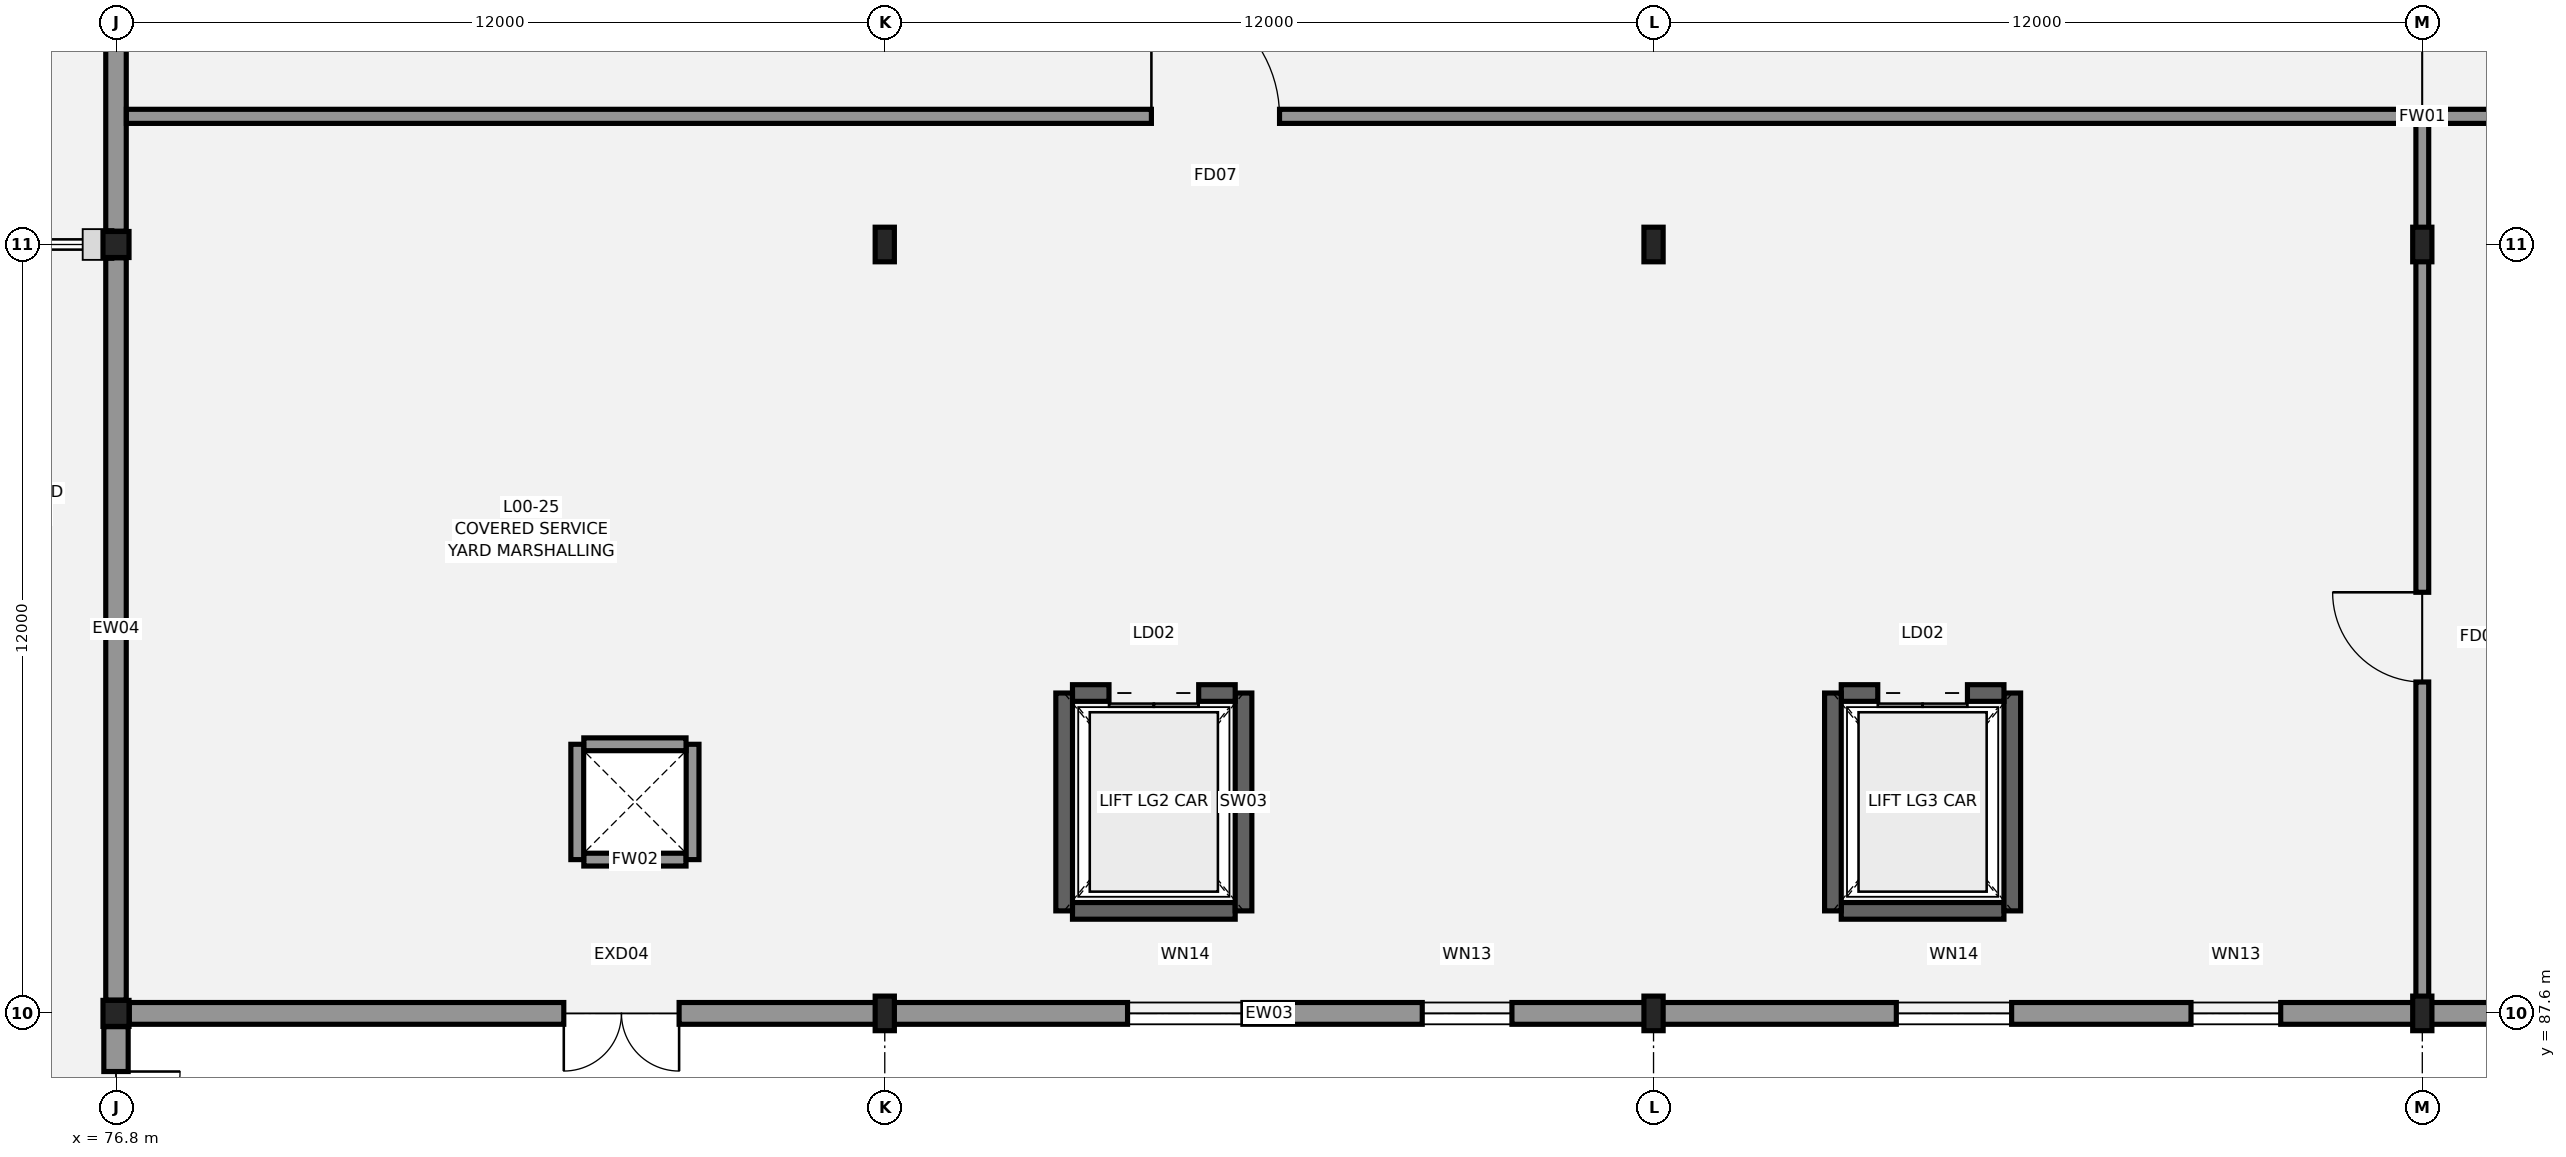
"""IFC4 building model, lengths in metres.
Left out: names, types, materials, properties, quantities, classifications, styles, units other than length and angle.
Written with IfcOpenShell. Run it as: python <this file> out.ifc"""

import sys

from ifc_helpers import new_model, si_unit, direction, frame, frame_2d, origin, origin_2d, place, context, subcontext, project, spatial, rectangle, hollow_circle, i_section, extrude, element, fill, save


model = new_model("IFC4")
c1 = context("Model", 3, precision=1e-05, world=origin(), true_north=direction((0.0, 1.0)))
c2 = subcontext(c1, "Body", "Model", "MODEL_VIEW")
j1 = project(units=[si_unit("LENGTHUNIT", "METRE"), si_unit("PLANEANGLEUNIT", "RADIAN")], contexts=[c1])
p1 = place(None, origin())
s1 = spatial("IfcSite", under=j1, at=p1, CompositionType="ELEMENT")
p2 = place(p1, origin())
s2 = spatial("IfcBuilding", under=s1, at=p2, CompositionType="ELEMENT")
p3 = place(p2, origin())
s3 = spatial("IfcBuildingStorey", under=s2, at=p3, CompositionType="ELEMENT", Elevation=0.0)
for number, where, z_axis, x_axis in (
    (1, (76.8, 87.6, 0.0), (0.0, 0.0, 1.0), (1.0, 0.0, 0.0)),
    (2, (76.8, 99.6, 0.0), (0.0, 0.0, 1.0), (1.0, 0.0, 0.0)),
):
    element("IfcColumn", number, at=place(p3, frame(where, z_axis=z_axis, x_axis=x_axis)), inside=s3, PredefinedType="COLUMN", context=c2, shape_type="SweptSolid", body=[
        extrude(hollow_circle(Radius=0.203, WallThickness=0.016, at=origin_2d()), origin(), (0.0, 0.0, 1.0), 5.4),
    ])
for number, where, z_axis, x_axis in (
    (3, (88.8, 87.6, 0.0), (0.0, 0.0, 1.0), (1.0, 0.0, 0.0)),
    (4, (88.8, 99.6, 0.0), (0.0, 0.0, 1.0), (1.0, 0.0, 0.0)),
    (5, (100.8, 87.6, 0.0), (0.0, 0.0, 1.0), (1.0, 0.0, 0.0)),
    (6, (100.8, 99.6, 0.0), (0.0, 0.0, 1.0), (1.0, 0.0, 0.0)),
    (7, (112.8, 87.6, 0.0), (0.0, 0.0, 1.0), (1.0, 0.0, 0.0)),
    (8, (112.8, 99.6, 0.0), (0.0, 0.0, 1.0), (1.0, 0.0, 0.0)),
):
    element("IfcColumn", number, at=place(p3, frame(where, z_axis=z_axis, x_axis=x_axis)), inside=s3, PredefinedType="COLUMN", context=c2, shape_type="SweptSolid", body=[
        extrude(i_section(OverallWidth=0.3, OverallDepth=0.54, WebThickness=0.012, FlangeThickness=0.024, FilletRadius=0.027, at=origin_2d()), origin(), (0.0, 0.0, 1.0), 6.3),
    ])
p4 = place(p3, frame((91.73, 89.2, 0.0), z_axis=(0.0, 0.0, 1.0), x_axis=(1.0, 0.0, 0.0)))
e9 = element("IfcWall", 9, at=p4, inside=s3, PredefinedType="SHEAR", context=c2, shape_type="SweptSolid", body=[
    extrude(rectangle(XDim=2.54, YDim=0.26, at=frame_2d((1.27, 0.0))), origin(), (0.0, 0.0, 1.0), 6.28),
])
p5 = place(p3, frame((94.4, 89.2, 0.0), z_axis=(0.0, 0.0, 1.0), x_axis=(0.0, 1.0, 0.0)))
e10 = element("IfcWall", 10, at=p5, inside=s3, PredefinedType="SHEAR", context=c2, shape_type="SweptSolid", body=[
    extrude(rectangle(XDim=3.4, YDim=0.26, at=frame_2d((1.7, 0.0))), origin(), (0.0, 0.0, 1.0), 6.28),
])
p6 = place(p3, frame((94.27, 92.6, 0.0), z_axis=(0.0, 0.0, 1.0), x_axis=(-1.0, 0.0, 0.0)))
e11 = element("IfcWall", 11, at=p6, inside=s3, PredefinedType="SHEAR", context=c2, shape_type="SweptSolid", body=[
    extrude(rectangle(XDim=2.54, YDim=0.26, at=frame_2d((1.27, 0.0))), origin(), (0.0, 0.0, 1.0), 6.28),
])
p7 = place(p6, frame((0.57, 0.0, 0.0)))
e12 = element("IfcOpeningElement", 12, at=p7, cuts=e11, PredefinedType="OPENING", context=c2, shape_type="SweptSolid", body=[
    extrude(rectangle(XDim=1.4, YDim=2.25, at=frame_2d((0.7, 1.125))), frame((0.0, 0.14, 0.0), z_axis=(0.0, -1.0, 0.0), x_axis=(1.0, 0.0, 0.0)), (0.0, 0.0, 1.0), 0.28),
])
p8 = place(p3, frame((91.6, 92.6, 0.0), z_axis=(0.0, 0.0, 1.0), x_axis=(0.0, -1.0, 0.0)))
e13 = element("IfcWall", 13, at=p8, inside=s3, PredefinedType="SHEAR", context=c2, shape_type="SweptSolid", body=[
    extrude(rectangle(XDim=3.4, YDim=0.26, at=frame_2d((1.7, 0.0))), origin(), (0.0, 0.0, 1.0), 6.28),
])
p9 = place(p3, frame((103.73, 89.2, 0.0), z_axis=(0.0, 0.0, 1.0), x_axis=(1.0, 0.0, 0.0)))
e14 = element("IfcWall", 14, at=p9, inside=s3, PredefinedType="SHEAR", context=c2, shape_type="SweptSolid", body=[
    extrude(rectangle(XDim=2.54, YDim=0.26, at=frame_2d((1.27, 0.0))), origin(), (0.0, 0.0, 1.0), 6.28),
])
p10 = place(p3, frame((106.4, 89.2, 0.0), z_axis=(0.0, 0.0, 1.0), x_axis=(0.0, 1.0, 0.0)))
e15 = element("IfcWall", 15, at=p10, inside=s3, PredefinedType="SHEAR", context=c2, shape_type="SweptSolid", body=[
    extrude(rectangle(XDim=3.4, YDim=0.26, at=frame_2d((1.7, 0.0))), origin(), (0.0, 0.0, 1.0), 6.28),
])
p11 = place(p3, frame((106.27, 92.6, 0.0), z_axis=(0.0, 0.0, 1.0), x_axis=(-1.0, 0.0, 0.0)))
e16 = element("IfcWall", 16, at=p11, inside=s3, PredefinedType="SHEAR", context=c2, shape_type="SweptSolid", body=[
    extrude(rectangle(XDim=2.54, YDim=0.26, at=frame_2d((1.27, 0.0))), origin(), (0.0, 0.0, 1.0), 6.28),
])
p12 = place(p11, frame((0.57, 0.0, 0.0)))
e17 = element("IfcOpeningElement", 17, at=p12, cuts=e16, PredefinedType="OPENING", context=c2, shape_type="SweptSolid", body=[
    extrude(rectangle(XDim=1.4, YDim=2.25, at=frame_2d((0.7, 1.125))), frame((0.0, 0.14, 0.0), z_axis=(0.0, -1.0, 0.0), x_axis=(1.0, 0.0, 0.0)), (0.0, 0.0, 1.0), 0.28),
])
p13 = place(p3, frame((103.6, 92.6, 0.0), z_axis=(0.0, 0.0, 1.0), x_axis=(0.0, -1.0, 0.0)))
e18 = element("IfcWall", 18, at=p13, inside=s3, PredefinedType="SHEAR", context=c2, shape_type="SweptSolid", body=[
    extrude(rectangle(XDim=3.4, YDim=0.26, at=frame_2d((1.7, 0.0))), origin(), (0.0, 0.0, 1.0), 6.28),
])
p14 = place(p3, frame((76.8, 87.393, 0.0), z_axis=(0.0, 0.0, 1.0), x_axis=(0.0, -1.0, 0.0)))
e19 = element("IfcWall", 19, at=p14, inside=s3, PredefinedType="STANDARD", context=c2, shape_type="SweptSolid", body=[
    extrude(rectangle(XDim=3.793, YDim=0.38, at=frame_2d((1.896, 0.0))), origin(), (0.0, 0.0, 1.0), 4.735),
])
p15 = place(p14, frame((0.7, 0.0, 0.0)))
e20 = element("IfcOpeningElement", 20, at=p15, cuts=e19, PredefinedType="OPENING", context=c2, shape_type="SweptSolid", body=[
    extrude(rectangle(XDim=2.0, YDim=2.3, at=frame_2d((1.0, 1.15))), frame((0.0, 0.2, 0.0), z_axis=(0.0, -1.0, 0.0), x_axis=(1.0, 0.0, 0.0)), (0.0, 0.0, 1.0), 0.4),
])
p16 = place(p3, frame((76.8, 87.807, 0.0), z_axis=(0.0, 0.0, 1.0), x_axis=(0.0, 1.0, 0.0)))
e21 = element("IfcWall", 21, at=p16, inside=s3, PredefinedType="STANDARD", context=c2, shape_type="SweptSolid", body=[
    extrude(rectangle(XDim=11.586, YDim=0.32, at=frame_2d((5.793, 0.0))), origin(), (0.0, 0.0, 1.0), 4.735),
])
p17 = place(p3, frame((76.8, 99.807, 0.0), z_axis=(0.0, 0.0, 1.0), x_axis=(0.0, 1.0, 0.0)))
e22 = element("IfcWall", 22, at=p17, inside=s3, PredefinedType="STANDARD", context=c2, shape_type="SweptSolid", body=[
    extrude(rectangle(XDim=11.586, YDim=0.32, at=frame_2d((5.793, 0.0))), origin(), (0.0, 0.0, 1.0), 5.935),
])
p18 = place(p17, frame((3.8, 0.0, 0.0)))
e23 = element("IfcOpeningElement", 23, at=p18, cuts=e22, PredefinedType="OPENING", context=c2, shape_type="SweptSolid", body=[
    extrude(rectangle(XDim=3.6, YDim=4.2, at=frame_2d((1.8, 2.1))), frame((0.0, 0.17, 0.0), z_axis=(0.0, -1.0, 0.0), x_axis=(1.0, 0.0, 0.0)), (0.0, 0.0, 1.0), 0.34),
])
p19 = place(p3, frame((88.79, 87.6, 0.0), z_axis=(0.0, 0.0, 1.0), x_axis=(-1.0, 0.0, 0.0)))
e24 = element("IfcWall", 24, at=p19, inside=s3, PredefinedType="STANDARD", context=c2, shape_type="SweptSolid", body=[
    extrude(rectangle(XDim=11.783, YDim=0.34, at=frame_2d((5.891, 0.0))), origin(), (0.0, 0.0, 1.0), 5.935),
])
p20 = place(p19, frame((3.2, 0.0, 0.0)))
e25 = element("IfcOpeningElement", 25, at=p20, cuts=e24, PredefinedType="OPENING", context=c2, shape_type="SweptSolid", body=[
    extrude(rectangle(XDim=1.8, YDim=2.3, at=frame_2d((0.9, 1.15))), frame((0.0, 0.18, 0.0), z_axis=(0.0, -1.0, 0.0), x_axis=(1.0, 0.0, 0.0)), (0.0, 0.0, 1.0), 0.36),
])
p21 = place(p3, frame((100.79, 87.6, 0.0), z_axis=(0.0, 0.0, 1.0), x_axis=(-1.0, 0.0, 0.0)))
e26 = element("IfcWall", 26, at=p21, inside=s3, PredefinedType="STANDARD", context=c2, shape_type="SweptSolid", body=[
    extrude(rectangle(XDim=11.979, YDim=0.34, at=frame_2d((5.99, 0.0))), origin(), (0.0, 0.0, 1.0), 5.935),
])
p22 = place(p21, frame((2.2, 0.0, 2.0)))
e27 = element("IfcOpeningElement", 27, at=p22, cuts=e26, PredefinedType="OPENING", context=c2, shape_type="SweptSolid", body=[
    extrude(rectangle(XDim=1.4, YDim=1.4, at=frame_2d((0.7, 0.7))), frame((0.0, 0.18, 0.0), z_axis=(0.0, -1.0, 0.0), x_axis=(1.0, 0.0, 0.0)), (0.0, 0.0, 1.0), 0.36),
])
p23 = place(p21, frame((6.4, 0.0, 2.0)))
e28 = element("IfcOpeningElement", 28, at=p23, cuts=e26, PredefinedType="OPENING", context=c2, shape_type="SweptSolid", body=[
    extrude(rectangle(XDim=1.8, YDim=1.4, at=frame_2d((0.9, 0.7))), frame((0.0, 0.18, 0.0), z_axis=(0.0, -1.0, 0.0), x_axis=(1.0, 0.0, 0.0)), (0.0, 0.0, 1.0), 0.36),
])
p24 = place(p3, frame((112.79, 87.6, 0.0), z_axis=(0.0, 0.0, 1.0), x_axis=(-1.0, 0.0, 0.0)))
e29 = element("IfcWall", 29, at=p24, inside=s3, PredefinedType="STANDARD", context=c2, shape_type="SweptSolid", body=[
    extrude(rectangle(XDim=11.979, YDim=0.34, at=frame_2d((5.99, 0.0))), origin(), (0.0, 0.0, 1.0), 5.935),
])
p25 = place(p24, frame((2.2, 0.0, 2.0)))
e30 = element("IfcOpeningElement", 30, at=p25, cuts=e29, PredefinedType="OPENING", context=c2, shape_type="SweptSolid", body=[
    extrude(rectangle(XDim=1.4, YDim=1.4, at=frame_2d((0.7, 0.7))), frame((0.0, 0.18, 0.0), z_axis=(0.0, -1.0, 0.0), x_axis=(1.0, 0.0, 0.0)), (0.0, 0.0, 1.0), 0.36),
])
p26 = place(p24, frame((6.4, 0.0, 2.0)))
e31 = element("IfcOpeningElement", 31, at=p26, cuts=e29, PredefinedType="OPENING", context=c2, shape_type="SweptSolid", body=[
    extrude(rectangle(XDim=1.8, YDim=1.4, at=frame_2d((0.9, 0.7))), frame((0.0, 0.18, 0.0), z_axis=(0.0, -1.0, 0.0), x_axis=(1.0, 0.0, 0.0)), (0.0, 0.0, 1.0), 0.36),
])
p27 = place(p3, frame((124.79, 87.6, 0.0), z_axis=(0.0, 0.0, 1.0), x_axis=(-1.0, 0.0, 0.0)))
e32 = element("IfcWall", 32, at=p27, inside=s3, PredefinedType="STANDARD", context=c2, shape_type="SweptSolid", body=[
    extrude(rectangle(XDim=11.979, YDim=0.34, at=frame_2d((5.99, 0.0))), origin(), (0.0, 0.0, 1.0), 5.935),
])
p28 = place(p3, frame((76.962, 101.6, 0.0), z_axis=(0.0, 0.0, 1.0), x_axis=(1.0, 0.0, 0.0)))
e33 = element("IfcWall", 33, at=p28, inside=s3, PredefinedType="PARTITIONING", context=c2, shape_type="SweptSolid", body=[
    extrude(rectangle(XDim=71.676, YDim=0.22, at=frame_2d((35.838, 0.0))), origin(), (0.0, 0.0, 1.0), 6.2),
])
p29 = place(p28, frame((16.0, 0.0, 0.0)))
e34 = element("IfcOpeningElement", 34, at=p29, cuts=e33, PredefinedType="OPENING", context=c2, shape_type="SweptSolid", body=[
    extrude(rectangle(XDim=2.0, YDim=2.2, at=frame_2d((1.0, 1.1))), frame((0.0, 0.12, 0.0), z_axis=(0.0, -1.0, 0.0), x_axis=(1.0, 0.0, 0.0)), (0.0, 0.0, 1.0), 0.24),
])
p30 = place(p28, frame((42.0, 0.0, 0.0)))
e35 = element("IfcOpeningElement", 35, at=p30, cuts=e33, PredefinedType="OPENING", context=c2, shape_type="SweptSolid", body=[
    extrude(rectangle(XDim=1.8, YDim=2.2, at=frame_2d((0.9, 1.1))), frame((0.0, 0.12, 0.0), z_axis=(0.0, -1.0, 0.0), x_axis=(1.0, 0.0, 0.0)), (0.0, 0.0, 1.0), 0.24),
])
p31 = place(p28, frame((64.0, 0.0, 0.0)))
e36 = element("IfcOpeningElement", 36, at=p31, cuts=e33, PredefinedType="OPENING", context=c2, shape_type="SweptSolid", body=[
    extrude(rectangle(XDim=1.1, YDim=2.15, at=frame_2d((0.55, 1.075))), frame((0.0, 0.12, 0.0), z_axis=(0.0, -1.0, 0.0), x_axis=(1.0, 0.0, 0.0)), (0.0, 0.0, 1.0), 0.24),
])
p32 = place(p3, frame((112.8, 87.772, 0.0), z_axis=(0.0, 0.0, 1.0), x_axis=(0.0, 1.0, 0.0)))
e37 = element("IfcWall", 37, at=p32, inside=s3, PredefinedType="PARTITIONING", context=c2, shape_type="SweptSolid", body=[
    extrude(rectangle(XDim=13.716, YDim=0.2, at=frame_2d((6.858, 0.0))), origin(), (0.0, 0.0, 1.0), 5.935),
])
p33 = place(p32, frame((5.0, 0.0, 0.0)))
e38 = element("IfcOpeningElement", 38, at=p33, cuts=e37, PredefinedType="OPENING", context=c2, shape_type="SweptSolid", body=[
    extrude(rectangle(XDim=1.4, YDim=2.2, at=frame_2d((0.7, 1.1))), frame((0.0, 0.11, 0.0), z_axis=(0.0, -1.0, 0.0), x_axis=(1.0, 0.0, 0.0)), (0.0, 0.0, 1.0), 0.22),
])
p34 = place(p3, frame((84.102, 90.0, 0.0), z_axis=(0.0, 0.0, 1.0), x_axis=(1.0, 0.0, 0.0)))
e39 = element("IfcWall", 39, at=p34, inside=s3, PredefinedType="PARTITIONING", context=c2, shape_type="SweptSolid", body=[
    extrude(rectangle(XDim=1.596, YDim=0.2, at=frame_2d((0.798, 0.0))), origin(), (0.0, 0.0, 1.0), 5.04),
])
p35 = place(p3, frame((85.8, 90.0, 0.0), z_axis=(0.0, 0.0, 1.0), x_axis=(0.0, 1.0, 0.0)))
e40 = element("IfcWall", 40, at=p35, inside=s3, PredefinedType="PARTITIONING", context=c2, shape_type="SweptSolid", body=[
    extrude(rectangle(XDim=1.8, YDim=0.2, at=frame_2d((0.9, 0.0))), origin(), (0.0, 0.0, 1.0), 5.04),
])
p36 = place(p3, frame((85.698, 91.8, 0.0), z_axis=(0.0, 0.0, 1.0), x_axis=(-1.0, 0.0, 0.0)))
e41 = element("IfcWall", 41, at=p36, inside=s3, PredefinedType="PARTITIONING", context=c2, shape_type="SweptSolid", body=[
    extrude(rectangle(XDim=1.596, YDim=0.2, at=frame_2d((0.798, 0.0))), origin(), (0.0, 0.0, 1.0), 5.04),
])
p37 = place(p3, frame((84.0, 91.8, 0.0), z_axis=(0.0, 0.0, 1.0), x_axis=(0.0, -1.0, 0.0)))
e42 = element("IfcWall", 42, at=p37, inside=s3, PredefinedType="PARTITIONING", context=c2, shape_type="SweptSolid", body=[
    extrude(rectangle(XDim=1.8, YDim=0.2, at=frame_2d((0.9, 0.0))), origin(), (0.0, 0.0, 1.0), 5.04),
])
p38 = place(p15, origin())
e43 = element("IfcDoor", 43, at=p38, inside=s3, OperationType="DOUBLE_DOOR_SINGLE_SWING", PredefinedType="DOOR", context=c2, shape_type="SweptSolid", body=[
    extrude(rectangle(XDim=2.0, YDim=2.3, at=frame_2d((1.0, 1.15))), frame((0.0, 0.025, 0.0), z_axis=(0.0, -1.0, 0.0), x_axis=(1.0, 0.0, 0.0)), (0.0, 0.0, 1.0), 0.05),
])
fill(e20, e43)
p39 = place(p20, origin())
e44 = element("IfcDoor", 44, at=p39, inside=s3, OperationType="DOUBLE_DOOR_SINGLE_SWING", PredefinedType="DOOR", context=c2, shape_type="SweptSolid", body=[
    extrude(rectangle(XDim=1.8, YDim=2.3, at=frame_2d((0.9, 1.15))), frame((0.0, 0.025, 0.0), z_axis=(0.0, -1.0, 0.0), x_axis=(1.0, 0.0, 0.0)), (0.0, 0.0, 1.0), 0.05),
])
fill(e25, e44)
p40 = place(p22, origin())
e45 = element("IfcWindow", 45, at=p40, inside=s3, PartitioningType="SINGLE_PANEL", PredefinedType="WINDOW", context=c2, shape_type="SweptSolid", body=[
    extrude(rectangle(XDim=1.4, YDim=1.4, at=frame_2d((0.7, 0.7))), frame((0.0, 0.03, 0.0), z_axis=(0.0, -1.0, 0.0), x_axis=(1.0, 0.0, 0.0)), (0.0, 0.0, 1.0), 0.06),
])
fill(e27, e45)
p41 = place(p23, origin())
e46 = element("IfcWindow", 46, at=p41, inside=s3, PartitioningType="SINGLE_PANEL", PredefinedType="WINDOW", context=c2, shape_type="SweptSolid", body=[
    extrude(rectangle(XDim=1.8, YDim=1.4, at=frame_2d((0.9, 0.7))), frame((0.0, 0.03, 0.0), z_axis=(0.0, -1.0, 0.0), x_axis=(1.0, 0.0, 0.0)), (0.0, 0.0, 1.0), 0.06),
])
fill(e28, e46)
p42 = place(p25, origin())
e47 = element("IfcWindow", 47, at=p42, inside=s3, PartitioningType="SINGLE_PANEL", PredefinedType="WINDOW", context=c2, shape_type="SweptSolid", body=[
    extrude(rectangle(XDim=1.4, YDim=1.4, at=frame_2d((0.7, 0.7))), frame((0.0, 0.03, 0.0), z_axis=(0.0, -1.0, 0.0), x_axis=(1.0, 0.0, 0.0)), (0.0, 0.0, 1.0), 0.06),
])
fill(e30, e47)
p43 = place(p26, origin())
e48 = element("IfcWindow", 48, at=p43, inside=s3, PartitioningType="SINGLE_PANEL", PredefinedType="WINDOW", context=c2, shape_type="SweptSolid", body=[
    extrude(rectangle(XDim=1.8, YDim=1.4, at=frame_2d((0.9, 0.7))), frame((0.0, 0.03, 0.0), z_axis=(0.0, -1.0, 0.0), x_axis=(1.0, 0.0, 0.0)), (0.0, 0.0, 1.0), 0.06),
])
fill(e31, e48)
p44 = place(p29, origin())
e49 = element("IfcDoor", 49, at=p44, inside=s3, OperationType="SINGLE_SWING_LEFT", PredefinedType="DOOR", context=c2, shape_type="SweptSolid", body=[
    extrude(rectangle(XDim=2.0, YDim=2.2, at=frame_2d((1.0, 1.1))), frame((0.0, 0.025, 0.0), z_axis=(0.0, -1.0, 0.0), x_axis=(1.0, 0.0, 0.0)), (0.0, 0.0, 1.0), 0.05),
])
fill(e34, e49)
p45 = place(p33, origin())
e50 = element("IfcDoor", 50, at=p45, inside=s3, OperationType="SINGLE_SWING_RIGHT", PredefinedType="DOOR", context=c2, shape_type="SweptSolid", body=[
    extrude(rectangle(XDim=1.4, YDim=2.2, at=frame_2d((0.7, 1.1))), frame((0.0, 0.025, 0.0), z_axis=(0.0, -1.0, 0.0), x_axis=(1.0, 0.0, 0.0)), (0.0, 0.0, 1.0), 0.05),
])
fill(e38, e50)
p46 = place(p7, origin())
e51 = element("IfcDoor", 51, at=p46, inside=s3, OperationType="DOUBLE_DOOR_SLIDING", PredefinedType="DOOR", context=c2, shape_type="SweptSolid", body=[
    extrude(rectangle(XDim=1.4, YDim=2.25, at=frame_2d((0.7, 1.125))), frame((0.0, 0.025, 0.0), z_axis=(0.0, -1.0, 0.0), x_axis=(1.0, 0.0, 0.0)), (0.0, 0.0, 1.0), 0.05),
])
fill(e12, e51)
p47 = place(p12, origin())
e52 = element("IfcDoor", 52, at=p47, inside=s3, OperationType="DOUBLE_DOOR_SLIDING", PredefinedType="DOOR", context=c2, shape_type="SweptSolid", body=[
    extrude(rectangle(XDim=1.4, YDim=2.25, at=frame_2d((0.7, 1.125))), frame((0.0, 0.025, 0.0), z_axis=(0.0, -1.0, 0.0), x_axis=(1.0, 0.0, 0.0)), (0.0, 0.0, 1.0), 0.05),
])
fill(e17, e52)
save(model, sys.argv[1])
